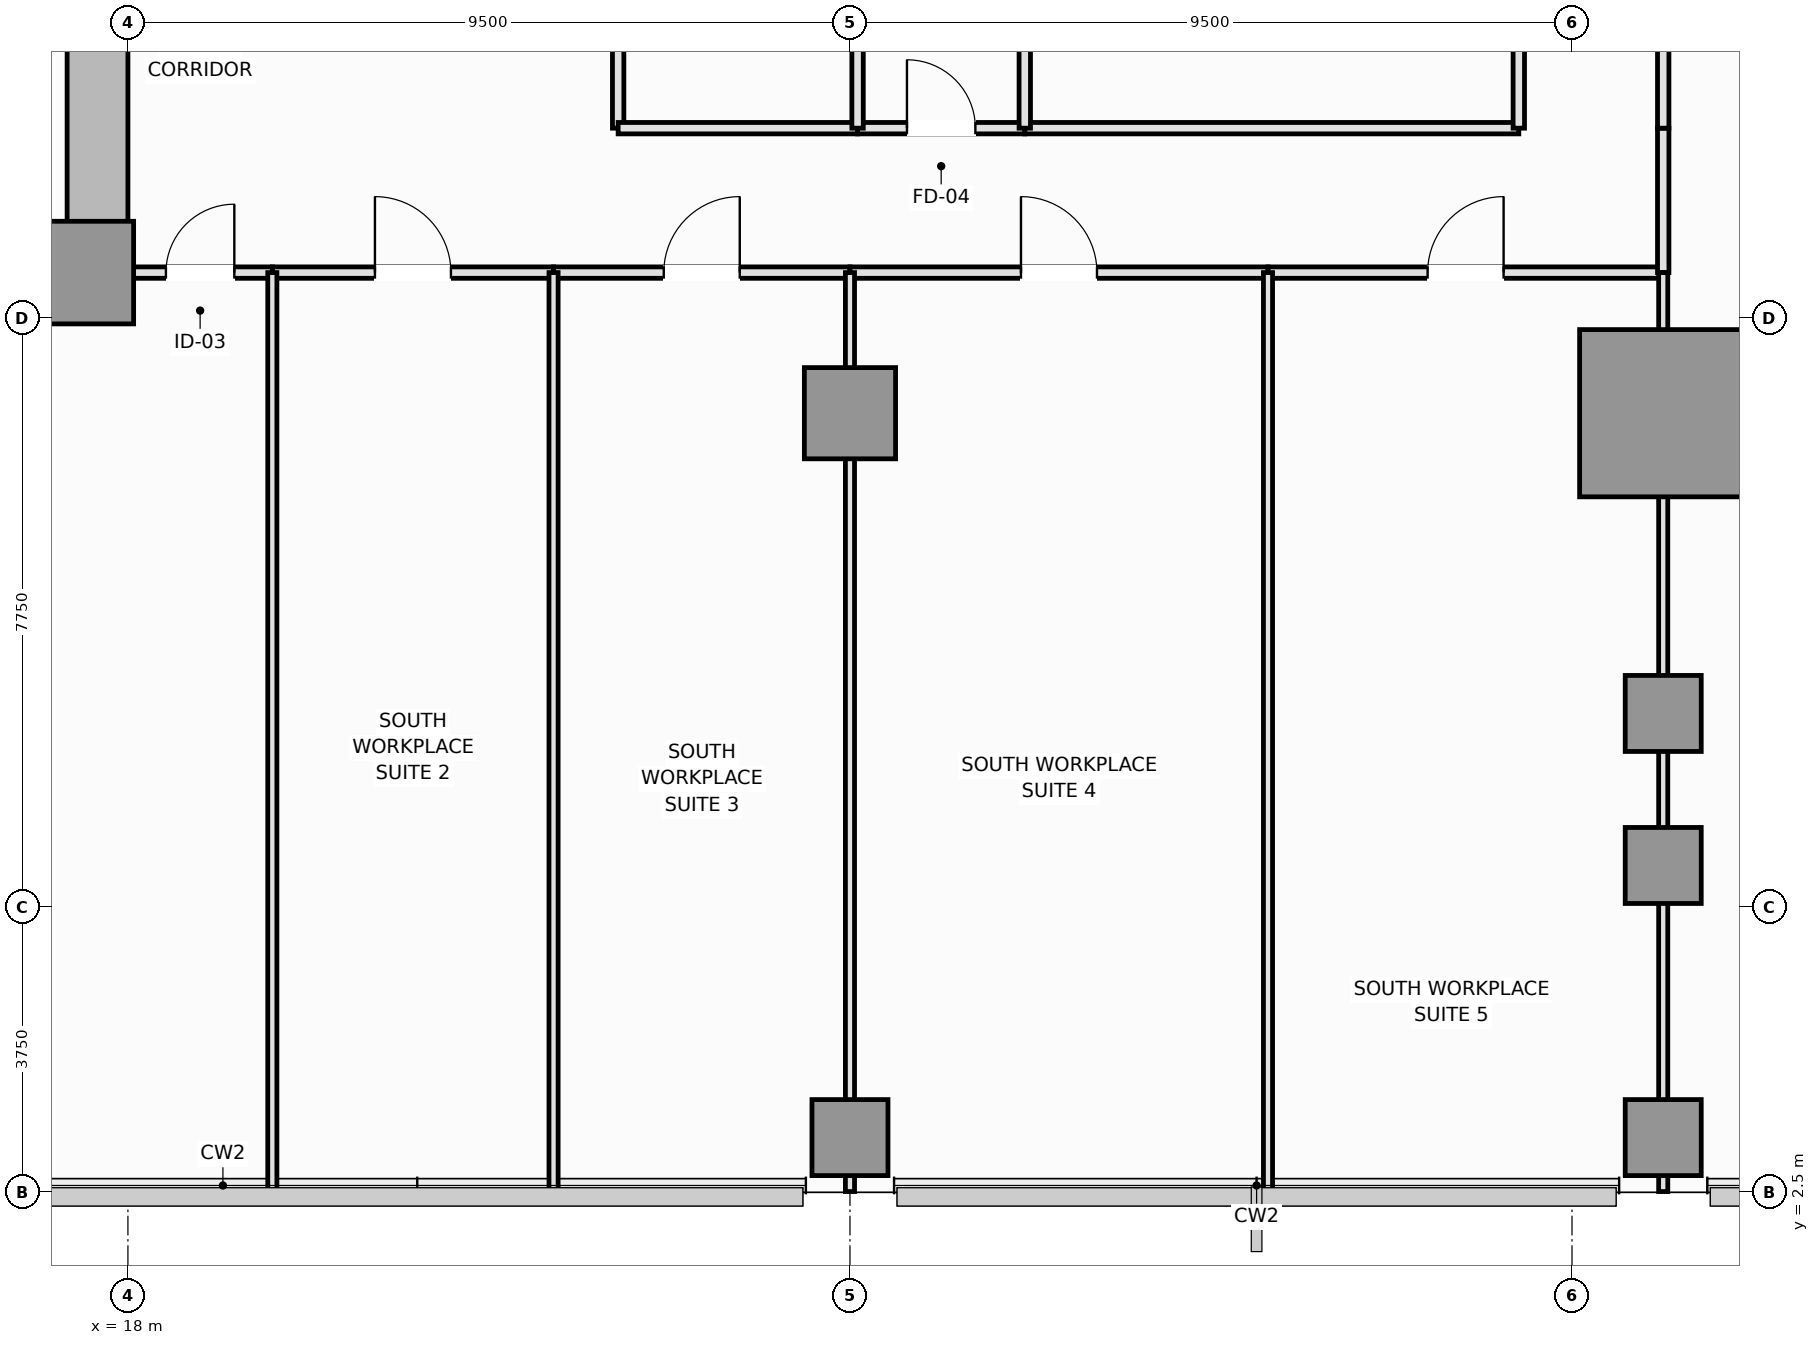
"""IFC4 building model, lengths in metres.
Left out: names, types, materials, properties, quantities, classifications, styles, units other than length and angle.
Written with IfcOpenShell. Run it as: python <this file> out.ifc"""

import sys

from ifc_helpers import new_model, si_unit, direction, frame, frame_2d, origin, origin_2d, place, context, subcontext, project, spatial, rectangle, extrude, element, fill, save


model = new_model("IFC4")
c1 = context("Model", 3, precision=1e-05, world=origin(), true_north=direction((0.0, 1.0)))
c2 = subcontext(c1, "Body", "Model", "MODEL_VIEW")
j1 = project(units=[si_unit("LENGTHUNIT", "METRE"), si_unit("PLANEANGLEUNIT", "RADIAN")], contexts=[c1])
p1 = place(None, origin())
s1 = spatial("IfcSite", under=j1, at=p1, CompositionType="ELEMENT")
p2 = place(p1, origin())
s2 = spatial("IfcBuilding", under=s1, at=p2, CompositionType="ELEMENT")
p3 = place(p2, frame((0.0, 0.0, 57.55)))
s3 = spatial("IfcBuildingStorey", under=s2, at=p3, CompositionType="ELEMENT", Elevation=57.55)
p4 = place(p3, frame((4.5, 14.4, 0.0), z_axis=(0.0, 0.0, 1.0), x_axis=(1.0, 0.0, 0.0)))
e1 = element("IfcWall", 1, at=p4, inside=s3, PredefinedType="SHEAR", context=c2, shape_type="SweptSolid", body=[
    extrude(rectangle(XDim=13.5, YDim=0.8, at=frame_2d((6.75, 0.0))), origin(), (0.0, 0.0, 1.0), 3.55),
])
p5 = place(p3, frame((17.6, 14.8, 0.0), z_axis=(0.0, 0.0, 1.0), x_axis=(0.0, 1.0, 0.0)))
e2 = element("IfcWall", 2, at=p5, inside=s3, PredefinedType="SHEAR", context=c2, shape_type="SweptSolid", body=[
    extrude(rectangle(XDim=8.65, YDim=0.8, at=frame_2d((4.325, 0.0))), origin(), (0.0, 0.0, 1.0), 3.55),
])
p6 = place(p5, frame((4.1, 0.0, 0.0)))
e3 = element("IfcOpeningElement", 3, at=p6, cuts=e2, PredefinedType="OPENING", context=c2, shape_type="SweptSolid", body=[
    extrude(rectangle(XDim=1.1, YDim=2.15, at=frame_2d((0.55, 1.075))), frame((0.0, 0.41, 0.0), z_axis=(0.0, -1.0, 0.0), x_axis=(1.0, 0.0, 0.0)), (0.0, 0.0, 1.0), 0.82),
])
p7 = place(p3, frame((17.4, 14.6, 0.0), z_axis=(0.0, 0.0, 1.0), x_axis=(1.0, 0.0, 0.0)))
e4 = element("IfcColumn", 4, at=p7, inside=s3, PredefinedType="PILASTER", context=c2, shape_type="SweptSolid", body=[
    extrude(rectangle(XDim=1.35, YDim=1.35, at=origin_2d()), origin(), (0.0, 0.0, 1.0), 3.55),
])
p8 = place(p3, frame((38.2, 12.75, 0.0), z_axis=(0.0, 0.0, 1.0), x_axis=(1.0, 0.0, 0.0)))
e5 = element("IfcColumn", 5, at=p8, inside=s3, PredefinedType="COLUMN", context=c2, shape_type="SweptSolid", body=[
    extrude(rectangle(XDim=2.2, YDim=2.2, at=origin_2d()), origin(), (0.0, 0.0, 1.0), 3.55),
])
p9 = place(p3, frame((27.5, 12.75, 0.0), z_axis=(0.0, 0.0, 1.0), x_axis=(1.0, 0.0, 0.0)))
e6 = element("IfcColumn", 6, at=p9, inside=s3, PredefinedType="COLUMN", context=c2, shape_type="SweptSolid", body=[
    extrude(rectangle(XDim=1.2, YDim=1.2, at=origin_2d()), origin(), (0.0, 0.0, 1.0), 3.55),
])
for number, where, z_axis, x_axis in (
    (7, (38.2, 6.8, 0.0), (0.0, 0.0, 1.0), (1.0, 0.0, 0.0)),
    (8, (38.2, 8.8, 0.0), (0.0, 0.0, 1.0), (1.0, 0.0, 0.0)),
    (9, (27.5, 3.22, 0.0), (0.0, 0.0, 1.0), (1.0, 0.0, 0.0)),
    (10, (38.2, 3.22, 0.0), (0.0, 0.0, 1.0), (1.0, 0.0, 0.0)),
):
    element("IfcColumn", number, at=place(p3, frame(where, z_axis=z_axis, x_axis=x_axis)), inside=s3, PredefinedType="COLUMN", context=c2, shape_type="SweptSolid", body=[
        extrude(rectangle(XDim=1.0, YDim=1.0, at=origin_2d()), origin(), (0.0, 0.0, 1.0), 3.55),
    ])
p10 = place(p3, frame((24.45, 16.5, 0.0), z_axis=(0.0, 0.0, 1.0), x_axis=(0.0, 1.0, 0.0)))
e11 = element("IfcWall", 11, at=p10, inside=s3, PredefinedType="PLUMBINGWALL", context=c2, shape_type="SweptSolid", body=[
    extrude(rectangle(XDim=3.1, YDim=0.15, at=frame_2d((1.55, 0.0))), origin(), (0.0, 0.0, 1.0), 3.37),
])
p11 = place(p10, frame((1.1, 0.0, 0.0)))
e12 = element("IfcOpeningElement", 12, at=p11, cuts=e11, PredefinedType="OPENING", context=c2, shape_type="SweptSolid", body=[
    extrude(rectangle(XDim=0.9, YDim=2.1, at=frame_2d((0.45, 1.05))), frame((0.0, 0.085, 0.0), z_axis=(0.0, -1.0, 0.0), x_axis=(1.0, 0.0, 0.0)), (0.0, 0.0, 1.0), 0.17),
])
p12 = place(p3, frame((24.45, 16.5, 0.0), z_axis=(0.0, 0.0, 1.0), x_axis=(1.0, 0.0, 0.0)))
e13 = element("IfcWall", 13, at=p12, inside=s3, PredefinedType="PLUMBINGWALL", context=c2, shape_type="SweptSolid", body=[
    extrude(rectangle(XDim=3.15, YDim=0.15, at=frame_2d((1.575, 0.0))), origin(), (0.0, 0.0, 1.0), 3.37),
])
p13 = place(p3, frame((27.6, 16.5, 0.0), z_axis=(0.0, 0.0, 1.0), x_axis=(1.0, 0.0, 0.0)))
e14 = element("IfcWall", 14, at=p13, inside=s3, PredefinedType="PLUMBINGWALL", context=c2, shape_type="SweptSolid", body=[
    extrude(rectangle(XDim=2.2, YDim=0.15, at=frame_2d((1.1, 0.0))), origin(), (0.0, 0.0, 1.0), 3.37),
])
p14 = place(p13, frame((0.65, 0.0, 0.0)))
e15 = element("IfcOpeningElement", 15, at=p14, cuts=e14, PredefinedType="OPENING", context=c2, shape_type="SweptSolid", body=[
    extrude(rectangle(XDim=0.9, YDim=2.1, at=frame_2d((0.45, 1.05))), frame((0.0, 0.085, 0.0), z_axis=(0.0, -1.0, 0.0), x_axis=(1.0, 0.0, 0.0)), (0.0, 0.0, 1.0), 0.17),
])
p15 = place(p3, frame((29.8, 16.5, 0.0), z_axis=(0.0, 0.0, 1.0), x_axis=(1.0, 0.0, 0.0)))
e16 = element("IfcWall", 16, at=p15, inside=s3, PredefinedType="PARTITIONING", context=c2, shape_type="SweptSolid", body=[
    extrude(rectangle(XDim=6.5, YDim=0.15, at=frame_2d((3.25, 0.0))), origin(), (0.0, 0.0, 1.0), 3.37),
])
p16 = place(p3, frame((18.0, 14.6, 0.0), z_axis=(0.0, 0.0, 1.0), x_axis=(1.0, 0.0, 0.0)))
e17 = element("IfcWall", 17, at=p16, inside=s3, PredefinedType="PARTITIONING", context=c2, shape_type="SweptSolid", body=[
    extrude(rectangle(XDim=1.9, YDim=0.15, at=frame_2d((0.95, 0.0))), origin(), (0.0, 0.0, 1.0), 3.37),
])
p17 = place(p16, frame((0.5, 0.0, 0.0)))
e18 = element("IfcOpeningElement", 18, at=p17, cuts=e17, PredefinedType="OPENING", context=c2, shape_type="SweptSolid", body=[
    extrude(rectangle(XDim=0.9, YDim=2.1, at=frame_2d((0.45, 1.05))), frame((0.0, 0.085, 0.0), z_axis=(0.0, -1.0, 0.0), x_axis=(1.0, 0.0, 0.0)), (0.0, 0.0, 1.0), 0.17),
])
p18 = place(p3, frame((19.9, 14.6, 0.0), z_axis=(0.0, 0.0, 1.0), x_axis=(1.0, 0.0, 0.0)))
e19 = element("IfcWall", 19, at=p18, inside=s3, PredefinedType="PARTITIONING", context=c2, shape_type="SweptSolid", body=[
    extrude(rectangle(XDim=3.7, YDim=0.15, at=frame_2d((1.85, 0.0))), origin(), (0.0, 0.0, 1.0), 3.37),
])
p19 = place(p18, frame((1.35, 0.0, 0.0)))
e20 = element("IfcOpeningElement", 20, at=p19, cuts=e19, PredefinedType="OPENING", context=c2, shape_type="SweptSolid", body=[
    extrude(rectangle(XDim=1.0, YDim=2.15, at=frame_2d((0.5, 1.075))), frame((0.0, 0.085, 0.0), z_axis=(0.0, -1.0, 0.0), x_axis=(1.0, 0.0, 0.0)), (0.0, 0.0, 1.0), 0.17),
])
p20 = place(p3, frame((23.6, 14.6, 0.0), z_axis=(0.0, 0.0, 1.0), x_axis=(1.0, 0.0, 0.0)))
e21 = element("IfcWall", 21, at=p20, inside=s3, PredefinedType="PARTITIONING", context=c2, shape_type="SweptSolid", body=[
    extrude(rectangle(XDim=3.9, YDim=0.15, at=frame_2d((1.95, 0.0))), origin(), (0.0, 0.0, 1.0), 3.37),
])
p21 = place(p20, frame((1.45, 0.0, 0.0)))
e22 = element("IfcOpeningElement", 22, at=p21, cuts=e21, PredefinedType="OPENING", context=c2, shape_type="SweptSolid", body=[
    extrude(rectangle(XDim=1.0, YDim=2.15, at=frame_2d((0.5, 1.075))), frame((0.0, 0.085, 0.0), z_axis=(0.0, -1.0, 0.0), x_axis=(1.0, 0.0, 0.0)), (0.0, 0.0, 1.0), 0.17),
])
p22 = place(p3, frame((27.5, 14.6, 0.0), z_axis=(0.0, 0.0, 1.0), x_axis=(1.0, 0.0, 0.0)))
e23 = element("IfcWall", 23, at=p22, inside=s3, PredefinedType="PARTITIONING", context=c2, shape_type="SweptSolid", body=[
    extrude(rectangle(XDim=5.5, YDim=0.15, at=frame_2d((2.75, 0.0))), origin(), (0.0, 0.0, 1.0), 3.37),
])
p23 = place(p22, frame((2.25, 0.0, 0.0)))
e24 = element("IfcOpeningElement", 24, at=p23, cuts=e23, PredefinedType="OPENING", context=c2, shape_type="SweptSolid", body=[
    extrude(rectangle(XDim=1.0, YDim=2.15, at=frame_2d((0.5, 1.075))), frame((0.0, 0.085, 0.0), z_axis=(0.0, -1.0, 0.0), x_axis=(1.0, 0.0, 0.0)), (0.0, 0.0, 1.0), 0.17),
])
p24 = place(p3, frame((33.0, 14.6, 0.0), z_axis=(0.0, 0.0, 1.0), x_axis=(1.0, 0.0, 0.0)))
e25 = element("IfcWall", 25, at=p24, inside=s3, PredefinedType="PARTITIONING", context=c2, shape_type="SweptSolid", body=[
    extrude(rectangle(XDim=5.2, YDim=0.15, at=frame_2d((2.6, 0.0))), origin(), (0.0, 0.0, 1.0), 3.37),
])
p25 = place(p24, frame((2.1, 0.0, 0.0)))
e26 = element("IfcOpeningElement", 26, at=p25, cuts=e25, PredefinedType="OPENING", context=c2, shape_type="SweptSolid", body=[
    extrude(rectangle(XDim=1.0, YDim=2.15, at=frame_2d((0.5, 1.075))), frame((0.0, 0.085, 0.0), z_axis=(0.0, -1.0, 0.0), x_axis=(1.0, 0.0, 0.0)), (0.0, 0.0, 1.0), 0.17),
])
p26 = place(p3, frame((38.2, 14.6, 0.0), z_axis=(0.0, 0.0, 1.0), x_axis=(0.0, 1.0, 0.0)))
e27 = element("IfcWall", 27, at=p26, inside=s3, PredefinedType="PARTITIONING", context=c2, shape_type="SweptSolid", body=[
    extrude(rectangle(XDim=1.9, YDim=0.15, at=frame_2d((0.95, 0.0))), origin(), (0.0, 0.0, 1.0), 2.82),
])
p27 = place(p3, frame((36.3, 16.5, 0.0), z_axis=(0.0, 0.0, 1.0), x_axis=(0.0, 1.0, 0.0)))
e28 = element("IfcWall", 28, at=p27, inside=s3, PredefinedType="PARTITIONING", context=c2, shape_type="SweptSolid", body=[
    extrude(rectangle(XDim=3.1, YDim=0.15, at=frame_2d((1.55, 0.0))), origin(), (0.0, 0.0, 1.0), 3.37),
])
p28 = place(p27, frame((1.485, 0.0, 0.0)))
e29 = element("IfcOpeningElement", 29, at=p28, cuts=e28, PredefinedType="OPENING", context=c2, shape_type="SweptSolid", body=[
    extrude(rectangle(XDim=1.0, YDim=2.15, at=frame_2d((0.5, 1.075))), frame((0.0, 0.085, 0.0), z_axis=(0.0, -1.0, 0.0), x_axis=(1.0, 0.0, 0.0)), (0.0, 0.0, 1.0), 0.17),
])
p29 = place(p3, frame((38.2, 16.5, 0.0), z_axis=(0.0, 0.0, 1.0), x_axis=(0.0, 1.0, 0.0)))
e30 = element("IfcWall", 30, at=p29, inside=s3, PredefinedType="PARTITIONING", context=c2, shape_type="SweptSolid", body=[
    extrude(rectangle(XDim=5.35, YDim=0.15, at=frame_2d((2.675, 0.0))), origin(), (0.0, 0.0, 1.0), 2.82),
])
p30 = place(p29, frame((2.988, 0.0, 0.0)))
e31 = element("IfcOpeningElement", 31, at=p30, cuts=e30, PredefinedType="OPENING", context=c2, shape_type="SweptSolid", body=[
    extrude(rectangle(XDim=1.0, YDim=2.15, at=frame_2d((0.5, 1.075))), frame((0.0, 0.085, 0.0), z_axis=(0.0, -1.0, 0.0), x_axis=(1.0, 0.0, 0.0)), (0.0, 0.0, 1.0), 0.17),
])
for number, where, z_axis, x_axis in (
    (32, (27.6, 16.5, 0.0), (0.0, 0.0, 1.0), (0.0, 1.0, 0.0)),
    (33, (29.8, 16.5, 0.0), (0.0, 0.0, 1.0), (0.0, 1.0, 0.0)),
):
    element("IfcWall", number, at=place(p3, frame(where, z_axis=z_axis, x_axis=x_axis)), inside=s3, PredefinedType="PLUMBINGWALL", context=c2, shape_type="SweptSolid", body=[
        extrude(rectangle(XDim=3.1, YDim=0.15, at=frame_2d((1.55, 0.0))), origin(), (0.0, 0.0, 1.0), 3.37),
    ])
for number, where, z_axis, x_axis in (
    (34, (19.9, 2.51, 0.0), (0.0, 0.0, 1.0), (0.0, 1.0, 0.0)),
    (35, (23.6, 2.51, 0.0), (0.0, 0.0, 1.0), (0.0, 1.0, 0.0)),
):
    element("IfcWall", number, at=place(p3, frame(where, z_axis=z_axis, x_axis=x_axis)), inside=s3, PredefinedType="PARTITIONING", context=c2, shape_type="SweptSolid", body=[
        extrude(rectangle(XDim=12.09, YDim=0.12, at=frame_2d((6.045, 0.0))), origin(), (0.0, 0.0, 1.0), 3.37),
    ])
p31 = place(p3, frame((27.5, 2.51, 0.0), z_axis=(0.0, 0.0, 1.0), x_axis=(0.0, 1.0, 0.0)))
e36 = element("IfcWall", 36, at=p31, inside=s3, PredefinedType="PARTITIONING", context=c2, shape_type="SweptSolid", body=[
    extrude(rectangle(XDim=12.09, YDim=0.12, at=frame_2d((6.045, 0.0))), origin(), (0.0, 0.0, 1.0), 2.82),
])
p32 = place(p3, frame((33.0, 2.51, 0.0), z_axis=(0.0, 0.0, 1.0), x_axis=(0.0, 1.0, 0.0)))
e37 = element("IfcWall", 37, at=p32, inside=s3, PredefinedType="PARTITIONING", context=c2, shape_type="SweptSolid", body=[
    extrude(rectangle(XDim=12.09, YDim=0.12, at=frame_2d((6.045, 0.0))), origin(), (0.0, 0.0, 1.0), 3.37),
])
p33 = place(p3, frame((38.2, 2.51, 0.0), z_axis=(0.0, 0.0, 1.0), x_axis=(0.0, 1.0, 0.0)))
e38 = element("IfcWall", 38, at=p33, inside=s3, PredefinedType="PARTITIONING", context=c2, shape_type="SweptSolid", body=[
    extrude(rectangle(XDim=12.09, YDim=0.12, at=frame_2d((6.045, 0.0))), origin(), (0.0, 0.0, 1.0), 2.82),
])
p34 = place(p14, origin())
e39 = element("IfcDoor", 39, at=p34, inside=s3, OperationType="SINGLE_SWING_LEFT", PredefinedType="DOOR", context=c2, shape_type="SweptSolid", body=[
    extrude(rectangle(XDim=0.9, YDim=2.1, at=frame_2d((0.45, 1.05))), frame((0.0, 0.025, 0.0), z_axis=(0.0, -1.0, 0.0), x_axis=(1.0, 0.0, 0.0)), (0.0, 0.0, 1.0), 0.05),
])
fill(e15, e39)
p35 = place(p17, origin())
e40 = element("IfcDoor", 40, at=p35, inside=s3, OperationType="SINGLE_SWING_RIGHT", PredefinedType="DOOR", context=c2, shape_type="SweptSolid", body=[
    extrude(rectangle(XDim=0.9, YDim=2.1, at=frame_2d((0.45, 1.05))), frame((0.0, 0.025, 0.0), z_axis=(0.0, -1.0, 0.0), x_axis=(1.0, 0.0, 0.0)), (0.0, 0.0, 1.0), 0.05),
])
fill(e18, e40)
p36 = place(p19, origin())
e41 = element("IfcDoor", 41, at=p36, inside=s3, OperationType="SINGLE_SWING_LEFT", PredefinedType="DOOR", context=c2, shape_type="SweptSolid", body=[
    extrude(rectangle(XDim=1.0, YDim=2.15, at=frame_2d((0.5, 1.075))), frame((0.0, 0.025, 0.0), z_axis=(0.0, -1.0, 0.0), x_axis=(1.0, 0.0, 0.0)), (0.0, 0.0, 1.0), 0.05),
])
fill(e20, e41)
p37 = place(p21, origin())
e42 = element("IfcDoor", 42, at=p37, inside=s3, OperationType="SINGLE_SWING_RIGHT", PredefinedType="DOOR", context=c2, shape_type="SweptSolid", body=[
    extrude(rectangle(XDim=1.0, YDim=2.15, at=frame_2d((0.5, 1.075))), frame((0.0, 0.025, 0.0), z_axis=(0.0, -1.0, 0.0), x_axis=(1.0, 0.0, 0.0)), (0.0, 0.0, 1.0), 0.05),
])
fill(e22, e42)
p38 = place(p23, origin())
e43 = element("IfcDoor", 43, at=p38, inside=s3, OperationType="SINGLE_SWING_LEFT", PredefinedType="DOOR", context=c2, shape_type="SweptSolid", body=[
    extrude(rectangle(XDim=1.0, YDim=2.15, at=frame_2d((0.5, 1.075))), frame((0.0, 0.025, 0.0), z_axis=(0.0, -1.0, 0.0), x_axis=(1.0, 0.0, 0.0)), (0.0, 0.0, 1.0), 0.05),
])
fill(e24, e43)
p39 = place(p25, origin())
e44 = element("IfcDoor", 44, at=p39, inside=s3, OperationType="SINGLE_SWING_RIGHT", PredefinedType="DOOR", context=c2, shape_type="SweptSolid", body=[
    extrude(rectangle(XDim=1.0, YDim=2.15, at=frame_2d((0.5, 1.075))), frame((0.0, 0.025, 0.0), z_axis=(0.0, -1.0, 0.0), x_axis=(1.0, 0.0, 0.0)), (0.0, 0.0, 1.0), 0.05),
])
fill(e26, e44)
save(model, sys.argv[1])
